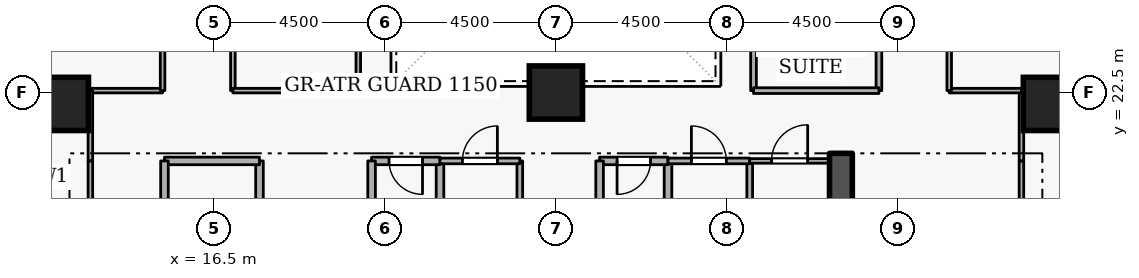
"""IFC4 building model, lengths in metres.
Left out: names, types, materials, properties, quantities, classifications, styles, units other than length and angle.
Written with IfcOpenShell. Run it as: python <this file> out.ifc"""

import sys

from ifc_helpers import new_model, si_unit, direction, frame, frame_2d, origin, origin_2d, place, context, subcontext, project, spatial, rectangle, extrude, element, fill, save


model = new_model("IFC4")
c1 = context("Model", 3, precision=1e-05, world=origin(), true_north=direction((0.0, 1.0)))
c2 = subcontext(c1, "Body", "Model", "MODEL_VIEW")
j1 = project(units=[si_unit("LENGTHUNIT", "METRE"), si_unit("PLANEANGLEUNIT", "RADIAN")], contexts=[c1])
p1 = place(None, origin())
s1 = spatial("IfcSite", under=j1, at=p1, CompositionType="ELEMENT")
p2 = place(p1, origin())
s2 = spatial("IfcBuilding", under=s1, at=p2, CompositionType="ELEMENT")
p3 = place(p2, frame((0.0, 0.0, 38.7)))
s3 = spatial("IfcBuildingStorey", under=s2, at=p3, CompositionType="ELEMENT", Elevation=38.7)
p4 = place(p3, frame((33.0, 15.2, 0.0), z_axis=(0.0, 0.0, 1.0), x_axis=(0.0, 1.0, 0.0)))
e1 = element("IfcWall", 1, at=p4, inside=s3, PredefinedType="SHEAR", context=c2, shape_type="SweptSolid", body=[
    extrude(rectangle(XDim=5.7, YDim=0.6, at=frame_2d((2.85, 0.0))), origin(), (0.0, 0.0, 1.0), 3.6),
])
for number, where, z_axis, x_axis in (
    (2, (12.5, 22.2, 0.0), (0.0, 0.0, 1.0), (1.0, 0.0, 0.0)),
    (3, (38.5, 22.2, 0.0), (0.0, 0.0, 1.0), (1.0, 0.0, 0.0)),
    (4, (25.5, 22.5, 0.0), (0.0, 0.0, 1.0), (1.0, 0.0, 0.0)),
):
    element("IfcColumn", number, at=place(p3, frame(where, z_axis=z_axis, x_axis=x_axis)), inside=s3, PredefinedType="COLUMN", context=c2, shape_type="SweptSolid", body=[
        extrude(rectangle(XDim=1.4, YDim=1.4, at=origin_2d()), origin(), (0.0, 0.0, 1.0), 3.6),
    ])
p5 = place(p3, frame((17.7, 18.4, 0.0), z_axis=(0.0, 0.0, 1.0), x_axis=(0.0, 1.0, 0.0)))
e5 = element("IfcWall", 5, at=p5, inside=s3, PredefinedType="STANDARD", context=c2, shape_type="SweptSolid", body=[
    extrude(rectangle(XDim=2.3, YDim=0.2, at=frame_2d((1.15, 0.0))), origin(), (0.0, 0.0, 1.0), 2.545),
])
p6 = place(p3, frame((17.7, 20.7, 0.0), z_axis=(0.0, 0.0, 1.0), x_axis=(-1.0, 0.0, 0.0)))
e6 = element("IfcWall", 6, at=p6, inside=s3, PredefinedType="STANDARD", context=c2, shape_type="SweptSolid", body=[
    extrude(rectangle(XDim=2.5, YDim=0.2, at=frame_2d((1.25, 0.0))), origin(), (0.0, 0.0, 1.0), 3.34),
])
p7 = place(p3, frame((15.2, 20.7, 0.0), z_axis=(0.0, 0.0, 1.0), x_axis=(0.0, -1.0, 0.0)))
e7 = element("IfcWall", 7, at=p7, inside=s3, PredefinedType="STANDARD", context=c2, shape_type="SweptSolid", body=[
    extrude(rectangle(XDim=5.7, YDim=0.2, at=frame_2d((2.85, 0.0))), origin(), (0.0, 0.0, 1.0), 3.34),
])
p8 = place(p7, frame((2.275, 0.0, 0.0)))
e8 = element("IfcOpeningElement", 8, at=p8, cuts=e7, PredefinedType="OPENING", context=c2, shape_type="SweptSolid", body=[
    extrude(rectangle(XDim=1.15, YDim=2.1, at=frame_2d((0.575, 1.05))), frame((0.0, 0.11, 0.0), z_axis=(0.0, -1.0, 0.0), x_axis=(1.0, 0.0, 0.0)), (0.0, 0.0, 1.0), 0.22),
])
p9 = place(p3, frame((28.45, 18.65, 0.0), z_axis=(0.0, 0.0, 1.0), x_axis=(0.0, 1.0, 0.0)))
e9 = element("IfcWall", 9, at=p9, inside=s3, PredefinedType="STANDARD", context=c2, shape_type="SweptSolid", body=[
    extrude(rectangle(XDim=2.05, YDim=0.2, at=frame_2d((1.025, 0.0))), origin(), (0.0, 0.0, 1.0), 3.34),
])
p10 = place(p3, frame((28.45, 20.7, 0.0), z_axis=(0.0, 0.0, 1.0), x_axis=(-1.0, 0.0, 0.0)))
e10 = element("IfcWall", 10, at=p10, inside=s3, PredefinedType="STANDARD", context=c2, shape_type="SweptSolid", body=[
    extrude(rectangle(XDim=1.8, YDim=0.2, at=frame_2d((0.9, 0.0))), origin(), (0.0, 0.0, 1.0), 3.34),
])
p11 = place(p10, frame((0.46, 0.0, 0.0)))
e11 = element("IfcOpeningElement", 11, at=p11, cuts=e10, PredefinedType="OPENING", context=c2, shape_type="SweptSolid", body=[
    extrude(rectangle(XDim=0.88, YDim=2.04, at=frame_2d((0.44, 1.02))), frame((0.0, 0.11, 0.0), z_axis=(0.0, -1.0, 0.0), x_axis=(1.0, 0.0, 0.0)), (0.0, 0.0, 1.0), 0.22),
])
for number, where, z_axis, x_axis in (
    (12, (26.65, 20.7, 0.0), (0.0, 0.0, 1.0), (0.0, -1.0, 0.0)),
    (13, (22.45, 18.65, 0.0), (0.0, 0.0, 1.0), (0.0, 1.0, 0.0)),
):
    element("IfcWall", number, at=place(p3, frame(where, z_axis=z_axis, x_axis=x_axis)), inside=s3, PredefinedType="STANDARD", context=c2, shape_type="SweptSolid", body=[
        extrude(rectangle(XDim=2.05, YDim=0.2, at=frame_2d((1.025, 0.0))), origin(), (0.0, 0.0, 1.0), 3.34),
    ])
p12 = place(p3, frame((22.45, 20.7, 0.0), z_axis=(0.0, 0.0, 1.0), x_axis=(-1.0, 0.0, 0.0)))
e14 = element("IfcWall", 14, at=p12, inside=s3, PredefinedType="STANDARD", context=c2, shape_type="SweptSolid", body=[
    extrude(rectangle(XDim=1.8, YDim=0.2, at=frame_2d((0.9, 0.0))), origin(), (0.0, 0.0, 1.0), 3.34),
])
p13 = place(p12, frame((0.46, 0.0, 0.0)))
e15 = element("IfcOpeningElement", 15, at=p13, cuts=e14, PredefinedType="OPENING", context=c2, shape_type="SweptSolid", body=[
    extrude(rectangle(XDim=0.88, YDim=2.04, at=frame_2d((0.44, 1.02))), frame((0.0, 0.11, 0.0), z_axis=(0.0, -1.0, 0.0), x_axis=(1.0, 0.0, 0.0)), (0.0, 0.0, 1.0), 0.22),
])
p14 = place(p3, frame((20.65, 20.7, 0.0), z_axis=(0.0, 0.0, 1.0), x_axis=(0.0, -1.0, 0.0)))
e16 = element("IfcWall", 16, at=p14, inside=s3, PredefinedType="STANDARD", context=c2, shape_type="SweptSolid", body=[
    extrude(rectangle(XDim=2.05, YDim=0.2, at=frame_2d((1.025, 0.0))), origin(), (0.0, 0.0, 1.0), 3.34),
])
p15 = place(p3, frame((24.55, 20.7, 0.0), z_axis=(0.0, 0.0, 1.0), x_axis=(0.0, -1.0, 0.0)))
e17 = element("IfcWall", 17, at=p15, inside=s3, PredefinedType="PARTITIONING", context=c2, shape_type="SweptSolid", body=[
    extrude(rectangle(XDim=2.05, YDim=0.15, at=frame_2d((1.025, 0.0))), origin(), (0.0, 0.0, 1.0), 3.34),
])
p16 = place(p3, frame((22.45, 20.7, 0.0), z_axis=(0.0, 0.0, 1.0), x_axis=(1.0, 0.0, 0.0)))
e18 = element("IfcWall", 18, at=p16, inside=s3, PredefinedType="PARTITIONING", context=c2, shape_type="SweptSolid", body=[
    extrude(rectangle(XDim=2.1, YDim=0.15, at=frame_2d((1.05, 0.0))), origin(), (0.0, 0.0, 1.0), 3.34),
])
p17 = place(p16, frame((0.59, 0.0, 0.0)))
e19 = element("IfcOpeningElement", 19, at=p17, cuts=e18, PredefinedType="OPENING", context=c2, shape_type="SweptSolid", body=[
    extrude(rectangle(XDim=0.92, YDim=2.08, at=frame_2d((0.46, 1.04))), frame((0.0, 0.085, 0.0), z_axis=(0.0, -1.0, 0.0), x_axis=(1.0, 0.0, 0.0)), (0.0, 0.0, 1.0), 0.17),
])
p18 = place(p3, frame((30.6, 20.7, 0.0), z_axis=(0.0, 0.0, 1.0), x_axis=(0.0, -1.0, 0.0)))
e20 = element("IfcWall", 20, at=p18, inside=s3, PredefinedType="PARTITIONING", context=c2, shape_type="SweptSolid", body=[
    extrude(rectangle(XDim=2.05, YDim=0.15, at=frame_2d((1.025, 0.0))), origin(), (0.0, 0.0, 1.0), 3.34),
])
p19 = place(p3, frame((28.45, 20.7, 0.0), z_axis=(0.0, 0.0, 1.0), x_axis=(1.0, 0.0, 0.0)))
e21 = element("IfcWall", 21, at=p19, inside=s3, PredefinedType="PARTITIONING", context=c2, shape_type="SweptSolid", body=[
    extrude(rectangle(XDim=2.15, YDim=0.15, at=frame_2d((1.075, 0.0))), origin(), (0.0, 0.0, 1.0), 3.34),
])
p20 = place(p19, frame((0.615, 0.0, 0.0)))
e22 = element("IfcOpeningElement", 22, at=p20, cuts=e21, PredefinedType="OPENING", context=c2, shape_type="SweptSolid", body=[
    extrude(rectangle(XDim=0.92, YDim=2.08, at=frame_2d((0.46, 1.04))), frame((0.0, 0.085, 0.0), z_axis=(0.0, -1.0, 0.0), x_axis=(1.0, 0.0, 0.0)), (0.0, 0.0, 1.0), 0.17),
])
p21 = place(p3, frame((30.6, 20.7, 0.0), z_axis=(0.0, 0.0, 1.0), x_axis=(1.0, 0.0, 0.0)))
e23 = element("IfcWall", 23, at=p21, inside=s3, PredefinedType="PARTITIONING", context=c2, shape_type="SweptSolid", body=[
    extrude(rectangle(XDim=2.1, YDim=0.12, at=frame_2d((1.05, 0.0))), origin(), (0.0, 0.0, 1.0), 3.34),
])
p22 = place(p21, frame((0.575, 0.0, 0.0)))
e24 = element("IfcOpeningElement", 24, at=p22, cuts=e23, PredefinedType="OPENING", context=c2, shape_type="SweptSolid", body=[
    extrude(rectangle(XDim=0.95, YDim=2.1, at=frame_2d((0.475, 1.05))), frame((0.0, 0.07, 0.0), z_axis=(0.0, -1.0, 0.0), x_axis=(1.0, 0.0, 0.0)), (0.0, 0.0, 1.0), 0.14),
])
p23 = place(p3, frame((15.15, 22.55, 0.0), z_axis=(0.0, 0.0, 1.0), x_axis=(-1.0, 0.0, 0.0)))
e25 = element("IfcWall", 25, at=p23, inside=s3, PredefinedType="PARTITIONING", context=c2, shape_type="SweptSolid", body=[
    extrude(rectangle(XDim=1.9, YDim=0.12, at=frame_2d((0.95, 0.0))), origin(), (0.0, 0.0, 1.0), 3.34),
])
p24 = place(p3, frame((13.25, 22.55, 0.0), z_axis=(0.0, 0.0, 1.0), x_axis=(0.0, -1.0, 0.0)))
e26 = element("IfcWall", 26, at=p24, inside=s3, PredefinedType="PARTITIONING", context=c2, shape_type="SweptSolid", body=[
    extrude(rectangle(XDim=1.85, YDim=0.12, at=frame_2d((0.925, 0.0))), origin(), (0.0, 0.0, 1.0), 3.34),
])
p25 = place(p3, frame((13.25, 20.7, 0.0), z_axis=(0.0, 0.0, 1.0), x_axis=(0.0, -1.0, 0.0)))
e27 = element("IfcWall", 27, at=p25, inside=s3, PredefinedType="PARTITIONING", context=c2, shape_type="SweptSolid", body=[
    extrude(rectangle(XDim=9.35, YDim=0.12, at=frame_2d((4.675, 0.0))), origin(), (0.0, 0.0, 1.0), 3.34),
])
p26 = place(p25, frame((4.15, 0.0, 0.0)))
e28 = element("IfcOpeningElement", 28, at=p26, cuts=e27, PredefinedType="OPENING", context=c2, shape_type="SweptSolid", body=[
    extrude(rectangle(XDim=1.05, YDim=2.1, at=frame_2d((0.525, 1.05))), frame((0.0, 0.07, 0.0), z_axis=(0.0, -1.0, 0.0), x_axis=(1.0, 0.0, 0.0)), (0.0, 0.0, 1.0), 0.14),
])
p27 = place(p3, frame((15.15, 27.0, 0.0), z_axis=(0.0, 0.0, 1.0), x_axis=(0.0, -1.0, 0.0)))
e29 = element("IfcWall", 29, at=p27, inside=s3, PredefinedType="PARTITIONING", context=c2, shape_type="SweptSolid", body=[
    extrude(rectangle(XDim=4.45, YDim=0.12, at=frame_2d((2.225, 0.0))), origin(), (0.0, 0.0, 1.0), 3.34),
])
p28 = place(p3, frame((37.75, 17.55, 0.0), z_axis=(0.0, 0.0, 1.0), x_axis=(0.0, 1.0, 0.0)))
e30 = element("IfcWall", 30, at=p28, inside=s3, PredefinedType="PARTITIONING", context=c2, shape_type="SweptSolid", body=[
    extrude(rectangle(XDim=3.15, YDim=0.12, at=frame_2d((1.575, 0.0))), origin(), (0.0, 0.0, 1.0), 3.34),
])
p29 = place(p3, frame((37.75, 20.7, 0.0), z_axis=(0.0, 0.0, 1.0), x_axis=(0.0, 1.0, 0.0)))
e31 = element("IfcWall", 31, at=p29, inside=s3, PredefinedType="PARTITIONING", context=c2, shape_type="SweptSolid", body=[
    extrude(rectangle(XDim=1.85, YDim=0.12, at=frame_2d((0.925, 0.0))), origin(), (0.0, 0.0, 1.0), 3.34),
])
p30 = place(p3, frame((37.75, 22.55, 0.0), z_axis=(0.0, 0.0, 1.0), x_axis=(-1.0, 0.0, 0.0)))
e32 = element("IfcWall", 32, at=p30, inside=s3, PredefinedType="PARTITIONING", context=c2, shape_type="SweptSolid", body=[
    extrude(rectangle(XDim=1.9, YDim=0.12, at=frame_2d((0.95, 0.0))), origin(), (0.0, 0.0, 1.0), 3.34),
])
p31 = place(p3, frame((35.85, 22.55, 0.0), z_axis=(0.0, 0.0, 1.0), x_axis=(0.0, 1.0, 0.0)))
e33 = element("IfcWall", 33, at=p31, inside=s3, PredefinedType="PARTITIONING", context=c2, shape_type="SweptSolid", body=[
    extrude(rectangle(XDim=4.45, YDim=0.12, at=frame_2d((2.225, 0.0))), origin(), (0.0, 0.0, 1.0), 3.34),
])
p32 = place(p31, frame((1.7, 0.0, 0.0)))
e34 = element("IfcOpeningElement", 34, at=p32, cuts=e33, PredefinedType="OPENING", context=c2, shape_type="SweptSolid", body=[
    extrude(rectangle(XDim=1.05, YDim=2.1, at=frame_2d((0.525, 1.05))), frame((0.0, 0.07, 0.0), z_axis=(0.0, -1.0, 0.0), x_axis=(1.0, 0.0, 0.0)), (0.0, 0.0, 1.0), 0.14),
])
p33 = place(p3, frame((30.7, 22.55, 0.0), z_axis=(0.0, 0.0, 1.0), x_axis=(0.0, 1.0, 0.0)))
e35 = element("IfcWall", 35, at=p33, inside=s3, PredefinedType="PARTITIONING", context=c2, shape_type="SweptSolid", body=[
    extrude(rectangle(XDim=8.9, YDim=0.15, at=frame_2d((4.45, 0.0))), origin(), (0.0, 0.0, 1.0), 3.34),
])
p34 = place(p3, frame((34.0, 31.45, 0.0), z_axis=(0.0, 0.0, 1.0), x_axis=(0.0, -1.0, 0.0)))
e36 = element("IfcWall", 36, at=p34, inside=s3, PredefinedType="PARTITIONING", context=c2, shape_type="SweptSolid", body=[
    extrude(rectangle(XDim=8.9, YDim=0.15, at=frame_2d((4.45, 0.0))), origin(), (0.0, 0.0, 1.0), 3.34),
])
p35 = place(p34, frame((3.8, 0.0, 0.0)))
e37 = element("IfcOpeningElement", 37, at=p35, cuts=e36, PredefinedType="OPENING", context=c2, shape_type="SweptSolid", body=[
    extrude(rectangle(XDim=1.3, YDim=2.12, at=frame_2d((0.65, 1.06))), frame((0.0, 0.085, 0.0), z_axis=(0.0, -1.0, 0.0), x_axis=(1.0, 0.0, 0.0)), (0.0, 0.0, 1.0), 0.17),
])
p36 = place(p3, frame((34.0, 22.55, 0.0), z_axis=(0.0, 0.0, 1.0), x_axis=(-1.0, 0.0, 0.0)))
e38 = element("IfcWall", 38, at=p36, inside=s3, PredefinedType="PARTITIONING", context=c2, shape_type="SweptSolid", body=[
    extrude(rectangle(XDim=3.3, YDim=0.15, at=frame_2d((1.65, 0.0))), origin(), (0.0, 0.0, 1.0), 3.34),
])
p37 = place(p3, frame((17.0, 22.55, 0.0), z_axis=(0.0, 0.0, 1.0), x_axis=(0.0, 1.0, 0.0)))
e39 = element("IfcWall", 39, at=p37, inside=s3, PredefinedType="PARTITIONING", context=c2, shape_type="SweptSolid", body=[
    extrude(rectangle(XDim=8.9, YDim=0.12, at=frame_2d((4.45, 0.0))), origin(), (0.0, 0.0, 1.0), 3.34),
])
p38 = place(p37, frame((3.975, 0.0, 0.0)))
e40 = element("IfcOpeningElement", 40, at=p38, cuts=e39, PredefinedType="OPENING", context=c2, shape_type="SweptSolid", body=[
    extrude(rectangle(XDim=0.95, YDim=2.1, at=frame_2d((0.475, 1.05))), frame((0.0, 0.07, 0.0), z_axis=(0.0, -1.0, 0.0), x_axis=(1.0, 0.0, 0.0)), (0.0, 0.0, 1.0), 0.14),
])
p39 = place(p3, frame((20.3, 31.45, 0.0), z_axis=(0.0, 0.0, 1.0), x_axis=(0.0, -1.0, 0.0)))
e41 = element("IfcWall", 41, at=p39, inside=s3, PredefinedType="PARTITIONING", context=c2, shape_type="SweptSolid", body=[
    extrude(rectangle(XDim=8.9, YDim=0.12, at=frame_2d((4.45, 0.0))), origin(), (0.0, 0.0, 1.0), 3.34),
])
p40 = place(p3, frame((20.3, 22.55, 0.0), z_axis=(0.0, 0.0, 1.0), x_axis=(-1.0, 0.0, 0.0)))
e42 = element("IfcWall", 42, at=p40, inside=s3, PredefinedType="PARTITIONING", context=c2, shape_type="SweptSolid", body=[
    extrude(rectangle(XDim=3.3, YDim=0.12, at=frame_2d((1.65, 0.0))), origin(), (0.0, 0.0, 1.0), 3.34),
])
p41 = place(p11, origin())
e43 = element("IfcDoor", 43, at=p41, inside=s3, OperationType="SINGLE_SWING_RIGHT", PredefinedType="DOOR", context=c2, shape_type="SweptSolid", body=[
    extrude(rectangle(XDim=0.88, YDim=2.04, at=frame_2d((0.44, 1.02))), frame((0.0, 0.025, 0.0), z_axis=(0.0, -1.0, 0.0), x_axis=(1.0, 0.0, 0.0)), (0.0, 0.0, 1.0), 0.05),
])
fill(e11, e43)
p42 = place(p13, origin())
e44 = element("IfcDoor", 44, at=p42, inside=s3, OperationType="SINGLE_SWING_LEFT", PredefinedType="DOOR", context=c2, shape_type="SweptSolid", body=[
    extrude(rectangle(XDim=0.88, YDim=2.04, at=frame_2d((0.44, 1.02))), frame((0.0, 0.025, 0.0), z_axis=(0.0, -1.0, 0.0), x_axis=(1.0, 0.0, 0.0)), (0.0, 0.0, 1.0), 0.05),
])
fill(e15, e44)
p43 = place(p17, origin())
e45 = element("IfcDoor", 45, at=p43, inside=s3, OperationType="SINGLE_SWING_RIGHT", PredefinedType="DOOR", context=c2, shape_type="SweptSolid", body=[
    extrude(rectangle(XDim=0.92, YDim=2.08, at=frame_2d((0.46, 1.04))), frame((0.0, 0.025, 0.0), z_axis=(0.0, -1.0, 0.0), x_axis=(1.0, 0.0, 0.0)), (0.0, 0.0, 1.0), 0.05),
])
fill(e19, e45)
p44 = place(p20, origin())
e46 = element("IfcDoor", 46, at=p44, inside=s3, OperationType="SINGLE_SWING_LEFT", PredefinedType="DOOR", context=c2, shape_type="SweptSolid", body=[
    extrude(rectangle(XDim=0.92, YDim=2.08, at=frame_2d((0.46, 1.04))), frame((0.0, 0.025, 0.0), z_axis=(0.0, -1.0, 0.0), x_axis=(1.0, 0.0, 0.0)), (0.0, 0.0, 1.0), 0.05),
])
fill(e22, e46)
p45 = place(p22, origin())
e47 = element("IfcDoor", 47, at=p45, inside=s3, OperationType="SINGLE_SWING_RIGHT", PredefinedType="DOOR", context=c2, shape_type="SweptSolid", body=[
    extrude(rectangle(XDim=0.95, YDim=2.1, at=frame_2d((0.475, 1.05))), frame((0.0, 0.025, 0.0), z_axis=(0.0, -1.0, 0.0), x_axis=(1.0, 0.0, 0.0)), (0.0, 0.0, 1.0), 0.05),
])
fill(e24, e47)
save(model, sys.argv[1])
